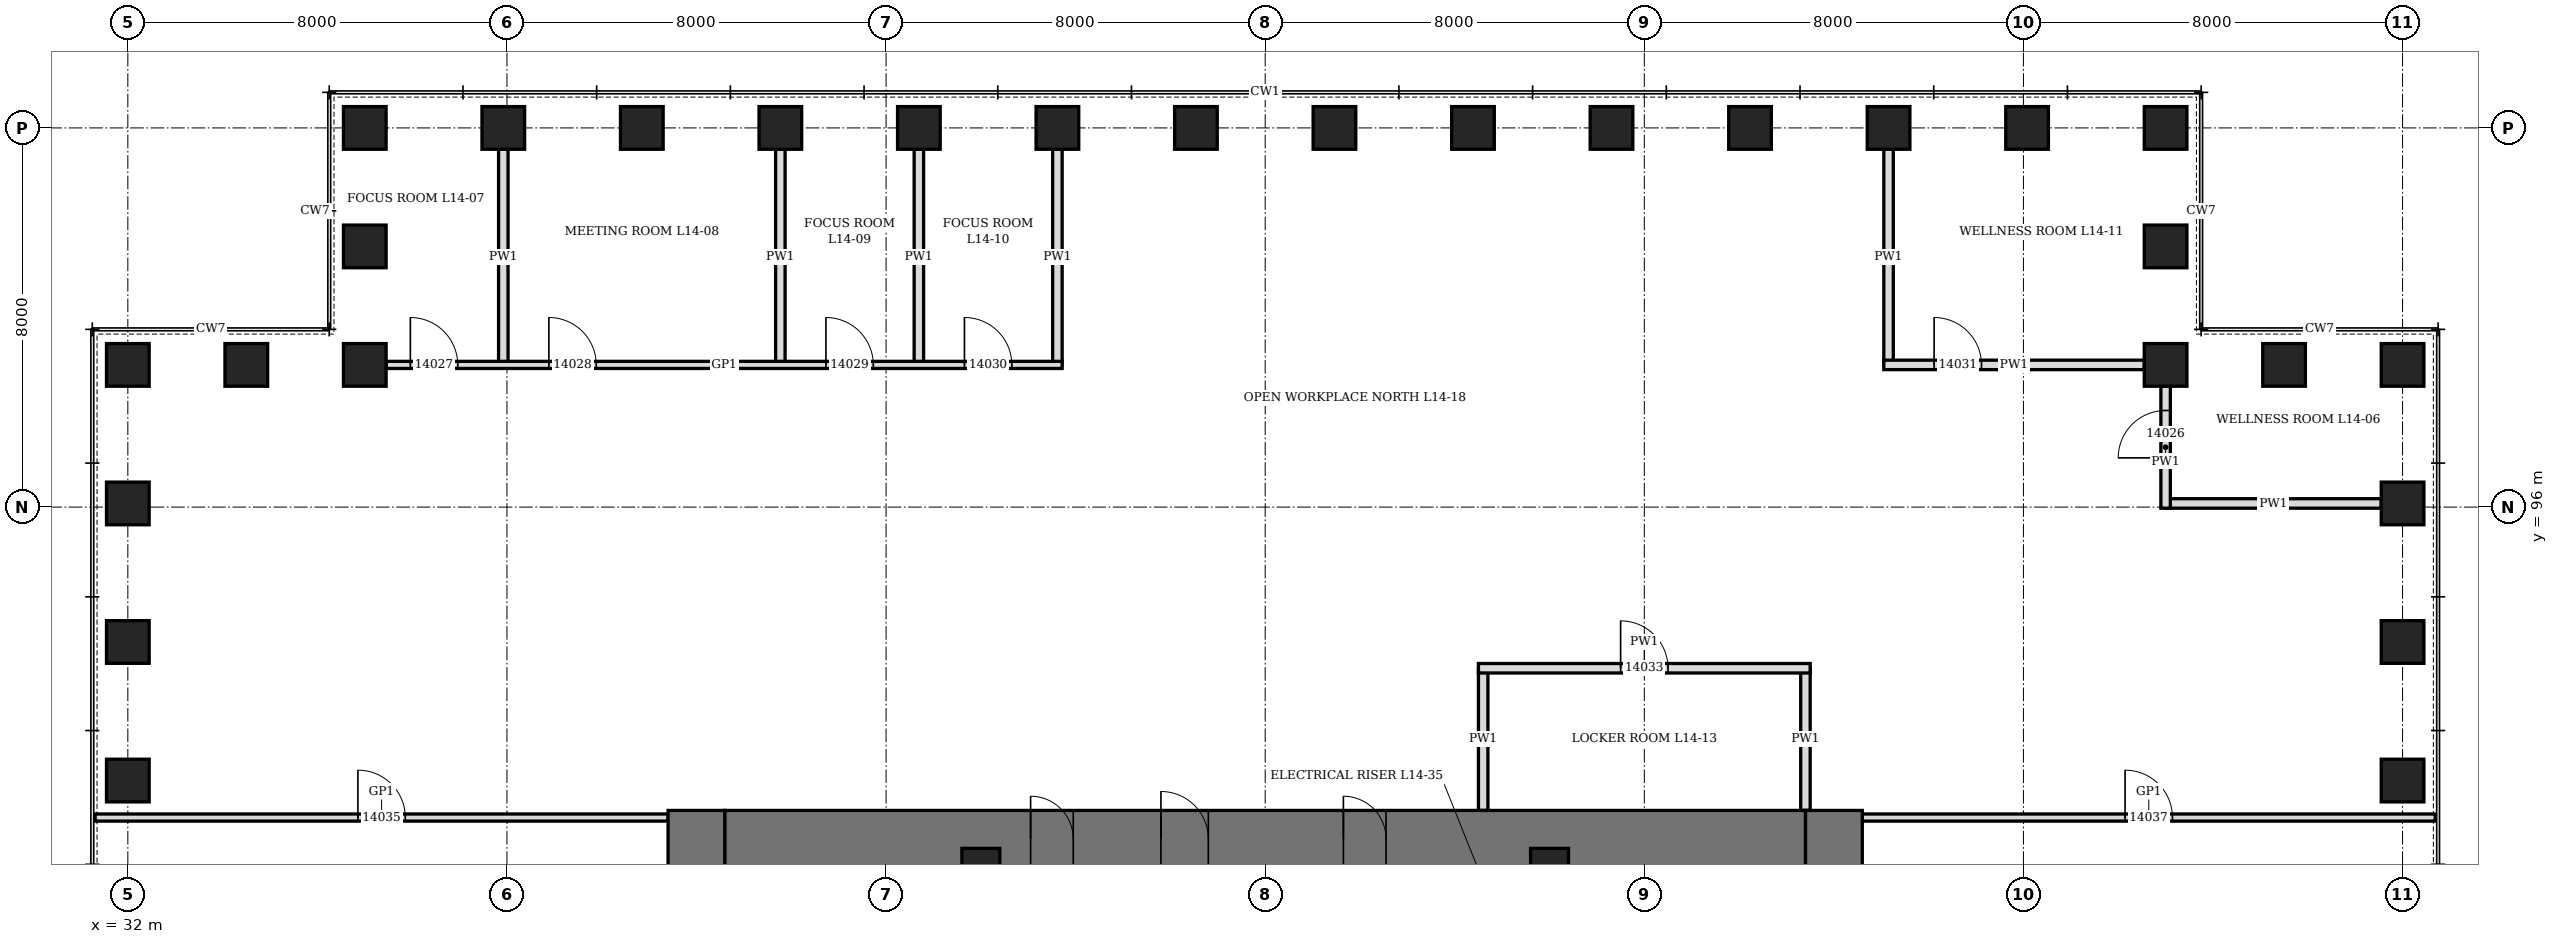
"""IFC4 building model, lengths in metres.
Left out: names, types, materials, properties, quantities, classifications, styles, units other than length and angle.
Written with IfcOpenShell. Run it as: python <this file> out.ifc"""

import sys

from ifc_helpers import new_model, si_unit, direction, frame, frame_2d, origin, origin_2d, place, context, subcontext, project, spatial, rectangle, hollow_rectangle, extrude, element, fill, save


model = new_model("IFC4")
c1 = context("Model", 3, precision=1e-05, world=origin(), true_north=direction((0.0, 1.0)))
c2 = subcontext(c1, "Body", "Model", "MODEL_VIEW")
j1 = project(units=[si_unit("LENGTHUNIT", "METRE"), si_unit("PLANEANGLEUNIT", "RADIAN")], contexts=[c1])
p1 = place(None, origin())
s1 = spatial("IfcSite", under=j1, at=p1, CompositionType="ELEMENT")
p2 = place(p1, origin())
s2 = spatial("IfcBuilding", under=s1, at=p2, CompositionType="ELEMENT")
p3 = place(p2, frame((0.0, 0.0, 68.5)))
s3 = spatial("IfcBuildingStorey", under=s2, at=p3, CompositionType="ELEMENT", Elevation=68.5)
for number, where, z_axis, x_axis in (
    (1, (80.0, 90.231, 0.0), (0.0, 0.0, 1.0), (0.0, 1.0, 0.0)),
    (2, (80.0, 93.154, 0.0), (0.0, 0.0, 1.0), (0.0, 1.0, 0.0)),
    (3, (80.0, 96.077, 0.0), (0.0, 0.0, 1.0), (0.0, 1.0, 0.0)),
    (4, (80.0, 99.0, 0.0), (0.0, 0.0, 1.0), (1.0, 0.0, 0.0)),
    (5, (77.5, 99.0, 0.0), (0.0, 0.0, 1.0), (1.0, 0.0, 0.0)),
    (6, (75.0, 99.0, 0.0), (0.0, 0.0, 1.0), (0.0, 1.0, 0.0)),
    (7, (75.0, 101.5, 0.0), (0.0, 0.0, 1.0), (0.0, 1.0, 0.0)),
    (8, (75.0, 104.0, 0.0), (0.0, 0.0, 1.0), (1.0, 0.0, 0.0)),
    (9, (72.077, 104.0, 0.0), (0.0, 0.0, 1.0), (1.0, 0.0, 0.0)),
    (10, (69.154, 104.0, 0.0), (0.0, 0.0, 1.0), (1.0, 0.0, 0.0)),
    (11, (66.231, 104.0, 0.0), (0.0, 0.0, 1.0), (1.0, 0.0, 0.0)),
    (12, (63.308, 104.0, 0.0), (0.0, 0.0, 1.0), (1.0, 0.0, 0.0)),
    (13, (60.385, 104.0, 0.0), (0.0, 0.0, 1.0), (1.0, 0.0, 0.0)),
    (14, (57.461, 104.0, 0.0), (0.0, 0.0, 1.0), (1.0, 0.0, 0.0)),
    (15, (54.539, 104.0, 0.0), (0.0, 0.0, 1.0), (1.0, 0.0, 0.0)),
    (16, (51.615, 104.0, 0.0), (0.0, 0.0, 1.0), (1.0, 0.0, 0.0)),
    (17, (48.692, 104.0, 0.0), (0.0, 0.0, 1.0), (1.0, 0.0, 0.0)),
    (18, (45.769, 104.0, 0.0), (0.0, 0.0, 1.0), (1.0, 0.0, 0.0)),
    (19, (42.846, 104.0, 0.0), (0.0, 0.0, 1.0), (1.0, 0.0, 0.0)),
    (20, (39.923, 104.0, 0.0), (0.0, 0.0, 1.0), (1.0, 0.0, 0.0)),
    (21, (37.0, 104.0, 0.0), (0.0, 0.0, 1.0), (0.0, 1.0, 0.0)),
    (22, (37.0, 101.5, 0.0), (0.0, 0.0, 1.0), (0.0, 1.0, 0.0)),
    (23, (37.0, 99.0, 0.0), (0.0, 0.0, 1.0), (1.0, 0.0, 0.0)),
    (24, (34.5, 99.0, 0.0), (0.0, 0.0, 1.0), (1.0, 0.0, 0.0)),
    (25, (32.0, 99.0, 0.0), (0.0, 0.0, 1.0), (0.0, 1.0, 0.0)),
    (26, (32.0, 96.077, 0.0), (0.0, 0.0, 1.0), (0.0, 1.0, 0.0)),
    (27, (32.0, 93.154, 0.0), (0.0, 0.0, 1.0), (0.0, 1.0, 0.0)),
    (28, (32.0, 90.231, 0.0), (0.0, 0.0, 1.0), (0.0, 1.0, 0.0)),
):
    element("IfcColumn", number, at=place(p3, frame(where, z_axis=z_axis, x_axis=x_axis)), inside=s3, PredefinedType="COLUMN", context=c2, shape_type="SweptSolid", body=[
        extrude(hollow_rectangle(XDim=0.9, YDim=0.9, WallThickness=0.12, at=origin_2d()), origin(), (0.0, 0.0, 1.0), 4.2),
    ])
p4 = place(p3, frame((44.0, 70.4, 0.0), z_axis=(0.0, 0.0, 1.0), x_axis=(0.0, 1.0, 0.0)))
e29 = element("IfcWall", 29, at=p4, inside=s3, PredefinedType="SHEAR", context=c2, shape_type="SweptSolid", body=[
    extrude(rectangle(XDim=19.2, YDim=1.2, at=frame_2d((9.6, 0.0))), origin(), (0.0, 0.0, 1.0), 4.2),
])
p5 = place(p4, frame((8.6, 0.0, 0.0)))
e30 = element("IfcOpeningElement", 30, at=p5, cuts=e29, PredefinedType="OPENING", context=c2, shape_type="SweptSolid", body=[
    extrude(rectangle(XDim=2.0, YDim=2.4, at=frame_2d((1.0, 1.2))), frame((0.0, 0.61, 0.0), z_axis=(0.0, -1.0, 0.0), x_axis=(1.0, 0.0, 0.0)), (0.0, 0.0, 1.0), 1.22),
])
p6 = place(p3, frame((68.0, 70.4, 0.0), z_axis=(0.0, 0.0, 1.0), x_axis=(0.0, 1.0, 0.0)))
e31 = element("IfcWall", 31, at=p6, inside=s3, PredefinedType="SHEAR", context=c2, shape_type="SweptSolid", body=[
    extrude(rectangle(XDim=19.2, YDim=1.2, at=frame_2d((9.6, 0.0))), origin(), (0.0, 0.0, 1.0), 4.2),
])
p7 = place(p6, frame((8.6, 0.0, 0.0)))
e32 = element("IfcOpeningElement", 32, at=p7, cuts=e31, PredefinedType="OPENING", context=c2, shape_type="SweptSolid", body=[
    extrude(rectangle(XDim=2.0, YDim=2.4, at=frame_2d((1.0, 1.2))), frame((0.0, 0.61, 0.0), z_axis=(0.0, -1.0, 0.0), x_axis=(1.0, 0.0, 0.0)), (0.0, 0.0, 1.0), 1.22),
])
p8 = place(p3, frame((44.6, 89.0, 0.0), z_axis=(0.0, 0.0, 1.0), x_axis=(1.0, 0.0, 0.0)))
e33 = element("IfcWall", 33, at=p8, inside=s3, PredefinedType="SHEAR", context=c2, shape_type="SweptSolid", body=[
    extrude(rectangle(XDim=22.8, YDim=1.2, at=frame_2d((11.4, 0.0))), origin(), (0.0, 0.0, 1.0), 4.2),
])
p9 = place(p8, frame((9.2, 0.0, 0.0)))
e34 = element("IfcOpeningElement", 34, at=p9, cuts=e33, PredefinedType="OPENING", context=c2, shape_type="SweptSolid", body=[
    extrude(rectangle(XDim=1.0, YDim=2.1, at=frame_2d((0.5, 1.05))), frame((0.0, 0.61, 0.0), z_axis=(0.0, -1.0, 0.0), x_axis=(1.0, 0.0, 0.0)), (0.0, 0.0, 1.0), 1.22),
])
p10 = place(p8, frame((6.45, 0.0, 0.0)))
e35 = element("IfcOpeningElement", 35, at=p10, cuts=e33, PredefinedType="OPENING", context=c2, shape_type="SweptSolid", body=[
    extrude(rectangle(XDim=0.9, YDim=2.1, at=frame_2d((0.45, 1.05))), frame((0.0, 0.61, 0.0), z_axis=(0.0, -1.0, 0.0), x_axis=(1.0, 0.0, 0.0)), (0.0, 0.0, 1.0), 1.22),
])
p11 = place(p8, frame((13.05, 0.0, 0.0)))
e36 = element("IfcOpeningElement", 36, at=p11, cuts=e33, PredefinedType="OPENING", context=c2, shape_type="SweptSolid", body=[
    extrude(rectangle(XDim=0.9, YDim=2.1, at=frame_2d((0.45, 1.05))), frame((0.0, 0.61, 0.0), z_axis=(0.0, -1.0, 0.0), x_axis=(1.0, 0.0, 0.0)), (0.0, 0.0, 1.0), 1.22),
])
for number, where, z_axis, x_axis in (
    (37, (50.0, 88.4, 0.0), (0.0, 0.0, 1.0), (1.0, 0.0, 0.0)),
    (38, (62.0, 88.4, 0.0), (0.0, 0.0, 1.0), (1.0, 0.0, 0.0)),
):
    element("IfcColumn", number, at=place(p3, frame(where, z_axis=z_axis, x_axis=x_axis)), inside=s3, PredefinedType="COLUMN", context=c2, shape_type="SweptSolid", body=[
        extrude(hollow_rectangle(XDim=0.8, YDim=0.8, WallThickness=0.1, at=origin_2d()), origin(), (0.0, 0.0, 1.0), 4.2),
    ])
for number, where, z_axis, x_axis in (
    (39, (75.0, 96.077, 0.0), (0.0, 0.0, 1.0), (1.0, 0.0, 0.0)),
    (40, (39.923, 99.0, 0.0), (0.0, 0.0, 1.0), (0.0, 1.0, 0.0)),
):
    element("IfcWall", number, at=place(p3, frame(where, z_axis=z_axis, x_axis=x_axis)), inside=s3, PredefinedType="PARTITIONING", context=c2, shape_type="SweptSolid", body=[
        extrude(rectangle(XDim=4.55, YDim=0.2, at=frame_2d((2.275, 0.0))), origin(), (0.0, 0.0, 1.0), 3.428),
    ])
for number, where, z_axis, x_axis in (
    (41, (45.769, 99.0, 0.0), (0.0, 0.0, 1.0), (0.0, 1.0, 0.0)),
    (42, (48.692, 99.0, 0.0), (0.0, 0.0, 1.0), (0.0, 1.0, 0.0)),
    (43, (51.615, 99.0, 0.0), (0.0, 0.0, 1.0), (0.0, 1.0, 0.0)),
    (44, (69.154, 99.0, 0.0), (0.0, 0.0, 1.0), (0.0, 1.0, 0.0)),
):
    element("IfcWall", number, at=place(p3, frame(where, z_axis=z_axis, x_axis=x_axis)), inside=s3, PredefinedType="PARTITIONING", context=c2, shape_type="SweptSolid", body=[
        extrude(rectangle(XDim=4.55, YDim=0.2, at=frame_2d((2.275, 0.0))), origin(), (0.0, 0.0, 1.0), 3.278),
    ])
for number, where, z_axis, x_axis in (
    (45, (60.6, 89.6, 0.0), (0.0, 0.0, 1.0), (0.0, 1.0, 0.0)),
    (46, (67.4, 89.6, 0.0), (0.0, 0.0, 1.0), (0.0, 1.0, 0.0)),
):
    element("IfcWall", number, at=place(p3, frame(where, z_axis=z_axis, x_axis=x_axis)), inside=s3, PredefinedType="PARTITIONING", context=c2, shape_type="SweptSolid", body=[
        extrude(rectangle(XDim=3.0, YDim=0.2, at=frame_2d((1.5, 0.0))), origin(), (0.0, 0.0, 1.0), 4.04),
    ])
p12 = place(p3, frame((31.31, 89.45, 0.0), z_axis=(0.0, 0.0, 1.0), x_axis=(1.0, 0.0, 0.0)))
e47 = element("IfcWall", 47, at=p12, inside=s3, PredefinedType="PARTITIONING", context=c2, shape_type="SweptSolid", body=[
    extrude(rectangle(XDim=12.09, YDim=0.15, at=frame_2d((6.045, 0.0))), origin(), (0.0, 0.0, 1.0), 4.04),
])
p13 = place(p12, frame((5.545, 0.0, 0.0)))
e48 = element("IfcOpeningElement", 48, at=p13, cuts=e47, PredefinedType="OPENING", context=c2, shape_type="SweptSolid", body=[
    extrude(rectangle(XDim=1.0, YDim=2.4, at=frame_2d((0.5, 1.2))), frame((0.0, 0.085, 0.0), z_axis=(0.0, -1.0, 0.0), x_axis=(1.0, 0.0, 0.0)), (0.0, 0.0, 1.0), 0.17),
])
p14 = place(p3, frame((68.6, 89.45, 0.0), z_axis=(0.0, 0.0, 1.0), x_axis=(1.0, 0.0, 0.0)))
e49 = element("IfcWall", 49, at=p14, inside=s3, PredefinedType="PARTITIONING", context=c2, shape_type="SweptSolid", body=[
    extrude(rectangle(XDim=12.09, YDim=0.15, at=frame_2d((6.045, 0.0))), origin(), (0.0, 0.0, 1.0), 4.04),
])
p15 = place(p14, frame((5.545, 0.0, 0.0)))
e50 = element("IfcOpeningElement", 50, at=p15, cuts=e49, PredefinedType="OPENING", context=c2, shape_type="SweptSolid", body=[
    extrude(rectangle(XDim=1.0, YDim=2.4, at=frame_2d((0.5, 1.2))), frame((0.0, 0.085, 0.0), z_axis=(0.0, -1.0, 0.0), x_axis=(1.0, 0.0, 0.0)), (0.0, 0.0, 1.0), 0.17),
])
p16 = place(p3, frame((60.5, 92.6, 0.0), z_axis=(0.0, 0.0, 1.0), x_axis=(1.0, 0.0, 0.0)))
e51 = element("IfcWall", 51, at=p16, inside=s3, PredefinedType="PARTITIONING", context=c2, shape_type="SweptSolid", body=[
    extrude(rectangle(XDim=7.0, YDim=0.2, at=frame_2d((3.5, 0.0))), origin(), (0.0, 0.0, 1.0), 4.04),
])
p17 = place(p16, frame((3.0, 0.0, 0.0)))
e52 = element("IfcOpeningElement", 52, at=p17, cuts=e51, PredefinedType="OPENING", context=c2, shape_type="SweptSolid", body=[
    extrude(rectangle(XDim=1.0, YDim=2.1, at=frame_2d((0.5, 1.05))), frame((0.0, 0.11, 0.0), z_axis=(0.0, -1.0, 0.0), x_axis=(1.0, 0.0, 0.0)), (0.0, 0.0, 1.0), 0.22),
])
p18 = place(p3, frame((37.45, 99.0, 0.0), z_axis=(0.0, 0.0, 1.0), x_axis=(1.0, 0.0, 0.0)))
e53 = element("IfcWall", 53, at=p18, inside=s3, PredefinedType="PARTITIONING", context=c2, shape_type="SweptSolid", body=[
    extrude(rectangle(XDim=14.265, YDim=0.15, at=frame_2d((7.133, 0.0))), origin(), (0.0, 0.0, 1.0), 4.04),
])
p19 = place(p18, frame((0.511, 0.0, 0.0)))
e54 = element("IfcOpeningElement", 54, at=p19, cuts=e53, PredefinedType="OPENING", context=c2, shape_type="SweptSolid", body=[
    extrude(rectangle(XDim=1.0, YDim=2.4, at=frame_2d((0.5, 1.2))), frame((0.0, 0.085, 0.0), z_axis=(0.0, -1.0, 0.0), x_axis=(1.0, 0.0, 0.0)), (0.0, 0.0, 1.0), 0.17),
])
p20 = place(p18, frame((3.435, 0.0, 0.0)))
e55 = element("IfcOpeningElement", 55, at=p20, cuts=e53, PredefinedType="OPENING", context=c2, shape_type="SweptSolid", body=[
    extrude(rectangle(XDim=1.0, YDim=2.4, at=frame_2d((0.5, 1.2))), frame((0.0, 0.085, 0.0), z_axis=(0.0, -1.0, 0.0), x_axis=(1.0, 0.0, 0.0)), (0.0, 0.0, 1.0), 0.17),
])
p21 = place(p18, frame((9.281, 0.0, 0.0)))
e56 = element("IfcOpeningElement", 56, at=p21, cuts=e53, PredefinedType="OPENING", context=c2, shape_type="SweptSolid", body=[
    extrude(rectangle(XDim=1.0, YDim=2.4, at=frame_2d((0.5, 1.2))), frame((0.0, 0.085, 0.0), z_axis=(0.0, -1.0, 0.0), x_axis=(1.0, 0.0, 0.0)), (0.0, 0.0, 1.0), 0.17),
])
p22 = place(p18, frame((12.204, 0.0, 0.0)))
e57 = element("IfcOpeningElement", 57, at=p22, cuts=e53, PredefinedType="OPENING", context=c2, shape_type="SweptSolid", body=[
    extrude(rectangle(XDim=1.0, YDim=2.4, at=frame_2d((0.5, 1.2))), frame((0.0, 0.085, 0.0), z_axis=(0.0, -1.0, 0.0), x_axis=(1.0, 0.0, 0.0)), (0.0, 0.0, 1.0), 0.17),
])
p23 = place(p3, frame((69.054, 99.0, 0.0), z_axis=(0.0, 0.0, 1.0), x_axis=(1.0, 0.0, 0.0)))
e58 = element("IfcWall", 58, at=p23, inside=s3, PredefinedType="PARTITIONING", context=c2, shape_type="SweptSolid", body=[
    extrude(rectangle(XDim=5.496, YDim=0.2, at=frame_2d((2.748, 0.0))), origin(), (0.0, 0.0, 1.0), 4.04),
])
p24 = place(p23, frame((1.062, 0.0, 0.0)))
e59 = element("IfcOpeningElement", 59, at=p24, cuts=e58, PredefinedType="OPENING", context=c2, shape_type="SweptSolid", body=[
    extrude(rectangle(XDim=1.0, YDim=2.1, at=frame_2d((0.5, 1.05))), frame((0.0, 0.11, 0.0), z_axis=(0.0, -1.0, 0.0), x_axis=(1.0, 0.0, 0.0)), (0.0, 0.0, 1.0), 0.22),
])
p25 = place(p3, frame((75.0, 95.977, 0.0), z_axis=(0.0, 0.0, 1.0), x_axis=(0.0, 1.0, 0.0)))
e60 = element("IfcWall", 60, at=p25, inside=s3, PredefinedType="PARTITIONING", context=c2, shape_type="SweptSolid", body=[
    extrude(rectangle(XDim=2.573, YDim=0.2, at=frame_2d((1.287, 0.0))), origin(), (0.0, 0.0, 1.0), 4.04),
])
p26 = place(p25, frame((1.062, 0.0, 0.0)))
e61 = element("IfcOpeningElement", 61, at=p26, cuts=e60, PredefinedType="OPENING", context=c2, shape_type="SweptSolid", body=[
    extrude(rectangle(XDim=1.0, YDim=2.1, at=frame_2d((0.5, 1.05))), frame((0.0, 0.11, 0.0), z_axis=(0.0, -1.0, 0.0), x_axis=(1.0, 0.0, 0.0)), (0.0, 0.0, 1.0), 0.22),
])
p27 = place(p9, origin())
e62 = element("IfcDoor", 62, at=p27, inside=s3, OperationType="SINGLE_SWING_LEFT", PredefinedType="DOOR", context=c2, shape_type="SweptSolid", body=[
    extrude(rectangle(XDim=1.0, YDim=2.1, at=frame_2d((0.5, 1.05))), frame((0.0, 0.35, 0.0), z_axis=(0.0, -1.0, 0.0), x_axis=(1.0, 0.0, 0.0)), (0.0, 0.0, 1.0), 0.7),
])
fill(e34, e62)
p28 = place(p10, origin())
e63 = element("IfcDoor", 63, at=p28, inside=s3, OperationType="SINGLE_SWING_LEFT", PredefinedType="DOOR", context=c2, shape_type="SweptSolid", body=[
    extrude(rectangle(XDim=0.9, YDim=2.1, at=frame_2d((0.45, 1.05))), frame((0.0, 0.35, 0.0), z_axis=(0.0, -1.0, 0.0), x_axis=(1.0, 0.0, 0.0)), (0.0, 0.0, 1.0), 0.7),
])
fill(e35, e63)
p29 = place(p11, origin())
e64 = element("IfcDoor", 64, at=p29, inside=s3, OperationType="SINGLE_SWING_LEFT", PredefinedType="DOOR", context=c2, shape_type="SweptSolid", body=[
    extrude(rectangle(XDim=0.9, YDim=2.1, at=frame_2d((0.45, 1.05))), frame((0.0, 0.35, 0.0), z_axis=(0.0, -1.0, 0.0), x_axis=(1.0, 0.0, 0.0)), (0.0, 0.0, 1.0), 0.7),
])
fill(e36, e64)
p30 = place(p26, origin())
e65 = element("IfcDoor", 65, at=p30, inside=s3, OperationType="SINGLE_SWING_LEFT", PredefinedType="DOOR", context=c2, shape_type="SweptSolid", body=[
    extrude(rectangle(XDim=1.0, YDim=2.1, at=frame_2d((0.5, 1.05))), frame((0.0, 0.1, 0.0), z_axis=(0.0, -1.0, 0.0), x_axis=(1.0, 0.0, 0.0)), (0.0, 0.0, 1.0), 0.199),
])
fill(e61, e65)
p31 = place(p19, origin())
e66 = element("IfcDoor", 66, at=p31, inside=s3, OperationType="SINGLE_SWING_RIGHT", PredefinedType="DOOR", context=c2, shape_type="SweptSolid", body=[
    extrude(rectangle(XDim=1.0, YDim=2.4, at=frame_2d((0.5, 1.2))), frame((0.0, 0.075, 0.0), z_axis=(0.0, -1.0, 0.0), x_axis=(1.0, 0.0, 0.0)), (0.0, 0.0, 1.0), 0.149),
])
fill(e54, e66)
p32 = place(p20, origin())
e67 = element("IfcDoor", 67, at=p32, inside=s3, OperationType="SINGLE_SWING_RIGHT", PredefinedType="DOOR", context=c2, shape_type="SweptSolid", body=[
    extrude(rectangle(XDim=1.0, YDim=2.4, at=frame_2d((0.5, 1.2))), frame((0.0, 0.075, 0.0), z_axis=(0.0, -1.0, 0.0), x_axis=(1.0, 0.0, 0.0)), (0.0, 0.0, 1.0), 0.149),
])
fill(e55, e67)
p33 = place(p21, origin())
e68 = element("IfcDoor", 68, at=p33, inside=s3, OperationType="SINGLE_SWING_RIGHT", PredefinedType="DOOR", context=c2, shape_type="SweptSolid", body=[
    extrude(rectangle(XDim=1.0, YDim=2.4, at=frame_2d((0.5, 1.2))), frame((0.0, 0.075, 0.0), z_axis=(0.0, -1.0, 0.0), x_axis=(1.0, 0.0, 0.0)), (0.0, 0.0, 1.0), 0.149),
])
fill(e56, e68)
p34 = place(p22, origin())
e69 = element("IfcDoor", 69, at=p34, inside=s3, OperationType="SINGLE_SWING_RIGHT", PredefinedType="DOOR", context=c2, shape_type="SweptSolid", body=[
    extrude(rectangle(XDim=1.0, YDim=2.4, at=frame_2d((0.5, 1.2))), frame((0.0, 0.075, 0.0), z_axis=(0.0, -1.0, 0.0), x_axis=(1.0, 0.0, 0.0)), (0.0, 0.0, 1.0), 0.149),
])
fill(e57, e69)
p35 = place(p24, origin())
e70 = element("IfcDoor", 70, at=p35, inside=s3, OperationType="SINGLE_SWING_LEFT", PredefinedType="DOOR", context=c2, shape_type="SweptSolid", body=[
    extrude(rectangle(XDim=1.0, YDim=2.1, at=frame_2d((0.5, 1.05))), frame((0.0, 0.1, 0.0), z_axis=(0.0, -1.0, 0.0), x_axis=(1.0, 0.0, 0.0)), (0.0, 0.0, 1.0), 0.199),
])
fill(e59, e70)
p36 = place(p17, origin())
e71 = element("IfcDoor", 71, at=p36, inside=s3, OperationType="SINGLE_SWING_LEFT", PredefinedType="DOOR", context=c2, shape_type="SweptSolid", body=[
    extrude(rectangle(XDim=1.0, YDim=2.1, at=frame_2d((0.5, 1.05))), frame((0.0, 0.1, 0.0), z_axis=(0.0, -1.0, 0.0), x_axis=(1.0, 0.0, 0.0)), (0.0, 0.0, 1.0), 0.199),
])
fill(e52, e71)
p37 = place(p13, origin())
e72 = element("IfcDoor", 72, at=p37, inside=s3, OperationType="SINGLE_SWING_RIGHT", PredefinedType="DOOR", context=c2, shape_type="SweptSolid", body=[
    extrude(rectangle(XDim=1.0, YDim=2.4, at=frame_2d((0.5, 1.2))), frame((0.0, 0.075, 0.0), z_axis=(0.0, -1.0, 0.0), x_axis=(1.0, 0.0, 0.0)), (0.0, 0.0, 1.0), 0.149),
])
fill(e48, e72)
p38 = place(p15, origin())
e73 = element("IfcDoor", 73, at=p38, inside=s3, OperationType="SINGLE_SWING_RIGHT", PredefinedType="DOOR", context=c2, shape_type="SweptSolid", body=[
    extrude(rectangle(XDim=1.0, YDim=2.4, at=frame_2d((0.5, 1.2))), frame((0.0, 0.075, 0.0), z_axis=(0.0, -1.0, 0.0), x_axis=(1.0, 0.0, 0.0)), (0.0, 0.0, 1.0), 0.149),
])
fill(e50, e73)
save(model, sys.argv[1])
